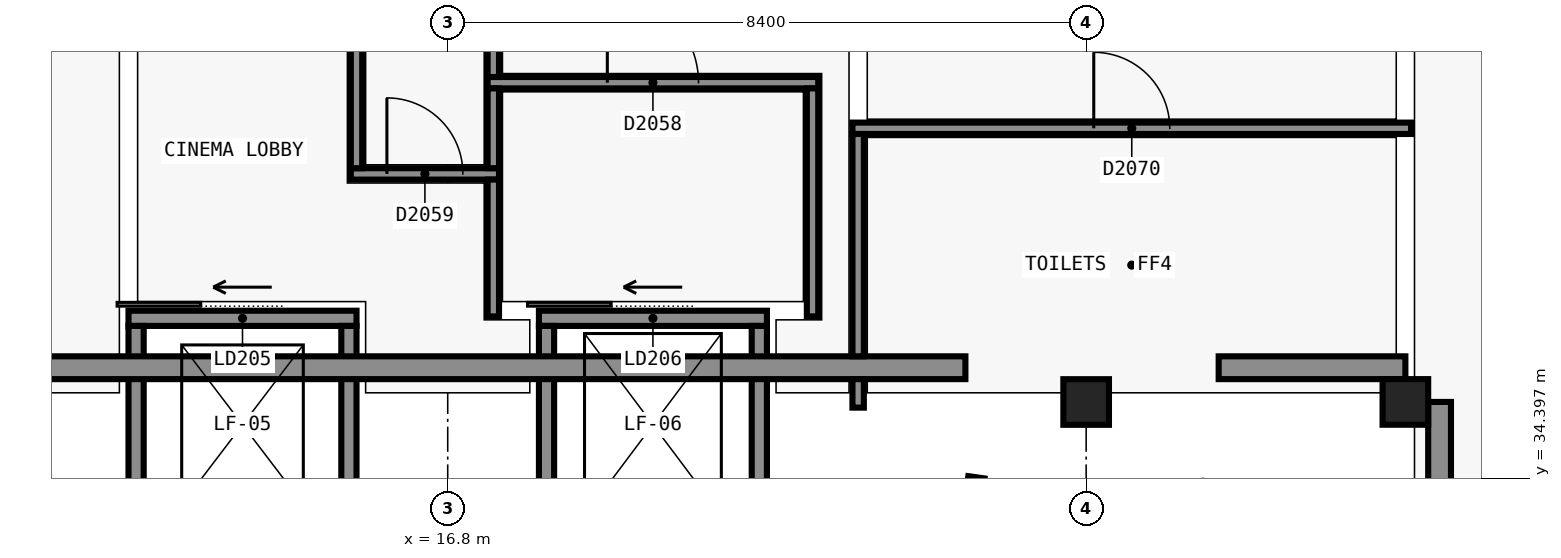
"""IFC4 building model, lengths in metres.
Left out: names, types, materials, properties, quantities, classifications, styles, units other than length and angle.
Written with IfcOpenShell. Run it as: python <this file> out.ifc"""

import sys

from ifc_helpers import new_model, si_unit, direction, frame, frame_2d, origin, origin_2d, place, context, subcontext, project, spatial, rectangle, extrude, element, fill, save


model = new_model("IFC4")
c1 = context("Model", 3, precision=1e-05, world=origin(), true_north=direction((0.0, 1.0)))
c2 = subcontext(c1, "Body", "Model", "MODEL_VIEW")
j1 = project(units=[si_unit("LENGTHUNIT", "METRE"), si_unit("PLANEANGLEUNIT", "RADIAN")], contexts=[c1])
p1 = place(None, origin())
s1 = spatial("IfcSite", under=j1, at=p1, CompositionType="ELEMENT")
p2 = place(p1, origin())
s2 = spatial("IfcBuilding", under=s1, at=p2, CompositionType="ELEMENT")
p3 = place(p2, frame((0.0, 0.0, 10.2)))
s3 = spatial("IfcBuildingStorey", under=s2, at=p3, CompositionType="ELEMENT", Elevation=10.2)
p4 = place(p3, frame((12.6, 36.5, 0.0), z_axis=(0.0, 0.0, 1.0), x_axis=(1.0, 0.0, 0.0)))
e1 = element("IfcWall", 1, at=p4, inside=s3, PredefinedType="SHEAR", context=c2, shape_type="SweptSolid", body=[
    extrude(rectangle(XDim=3.0, YDim=0.2, at=frame_2d((1.5, 0.0))), origin(), (0.0, 0.0, 1.0), 4.8),
])
p5 = place(p4, frame((0.95, 0.0, 0.0)))
e2 = element("IfcOpeningElement", 2, at=p5, cuts=e1, PredefinedType="OPENING", context=c2, shape_type="SweptSolid", body=[
    extrude(rectangle(XDim=1.1, YDim=2.1, at=frame_2d((0.55, 1.05))), frame((0.0, 0.11, 0.0), z_axis=(0.0, -1.0, 0.0), x_axis=(1.0, 0.0, 0.0)), (0.0, 0.0, 1.0), 0.22),
])
for number, where, z_axis, x_axis in (
    (3, (12.7, 33.8, 0.0), (0.0, 0.0, 1.0), (0.0, 1.0, 0.0)),
    (4, (15.5, 36.4, 0.0), (0.0, 0.0, 1.0), (0.0, -1.0, 0.0)),
):
    element("IfcWall", number, at=place(p3, frame(where, z_axis=z_axis, x_axis=x_axis)), inside=s3, PredefinedType="SHEAR", context=c2, shape_type="SweptSolid", body=[
        extrude(rectangle(XDim=2.6, YDim=0.2, at=frame_2d((1.3, 0.0))), origin(), (0.0, 0.0, 1.0), 4.8),
    ])
p6 = place(p3, frame((18.0, 36.5, 0.0), z_axis=(0.0, 0.0, 1.0), x_axis=(1.0, 0.0, 0.0)))
e5 = element("IfcWall", 5, at=p6, inside=s3, PredefinedType="SHEAR", context=c2, shape_type="SweptSolid", body=[
    extrude(rectangle(XDim=3.0, YDim=0.2, at=frame_2d((1.5, 0.0))), origin(), (0.0, 0.0, 1.0), 4.8),
])
p7 = place(p6, frame((0.95, 0.0, 0.0)))
e6 = element("IfcOpeningElement", 6, at=p7, cuts=e5, PredefinedType="OPENING", context=c2, shape_type="SweptSolid", body=[
    extrude(rectangle(XDim=1.1, YDim=2.1, at=frame_2d((0.55, 1.05))), frame((0.0, 0.11, 0.0), z_axis=(0.0, -1.0, 0.0), x_axis=(1.0, 0.0, 0.0)), (0.0, 0.0, 1.0), 0.22),
])
for number, where, z_axis, x_axis in (
    (7, (18.1, 33.8, 0.0), (0.0, 0.0, 1.0), (0.0, 1.0, 0.0)),
    (8, (20.9, 36.4, 0.0), (0.0, 0.0, 1.0), (0.0, -1.0, 0.0)),
):
    element("IfcWall", number, at=place(p3, frame(where, z_axis=z_axis, x_axis=x_axis)), inside=s3, PredefinedType="SHEAR", context=c2, shape_type="SweptSolid", body=[
        extrude(rectangle(XDim=2.6, YDim=0.2, at=frame_2d((1.3, 0.0))), origin(), (0.0, 0.0, 1.0), 4.8),
    ])
for number, where, z_axis, x_axis in (
    (9, (25.2, 35.399, 0.0), (0.0, 0.0, 1.0), (1.0, 0.0, 0.0)),
    (10, (29.4, 35.4, 0.0), (0.0, 0.0, 1.0), (1.0, 0.0, 0.0)),
):
    element("IfcColumn", number, at=place(p3, frame(where, z_axis=z_axis, x_axis=x_axis)), inside=s3, PredefinedType="COLUMN", context=c2, shape_type="SweptSolid", body=[
        extrude(rectangle(XDim=0.6, YDim=0.6, at=origin_2d()), origin(), (0.0, 0.0, 1.0), 4.8),
    ])
p8 = place(p3, frame((23.756, 34.409, 0.0), z_axis=(0.0, 0.0, 1.0), x_axis=(-0.13918000587, -0.990267098295, 0.0)))
e11 = element("IfcWall", 11, at=p8, inside=s3, PredefinedType="SOLIDWALL", context=c2, shape_type="SweptSolid", body=[
    extrude(rectangle(XDim=1.8, YDim=0.215, at=frame_2d((0.9, 0.0))), origin(), (0.0, 0.0, 1.0), 4.5),
])
p9 = place(p3, frame((23.611, 35.85, 0.0), z_axis=(0.0, 0.0, 1.0), x_axis=(-1.0, 0.0, 0.0)))
e12 = element("IfcWall", 12, at=p9, inside=s3, PredefinedType="SOLIDWALL", context=c2, shape_type="SweptSolid", body=[
    extrude(rectangle(XDim=13.468, YDim=0.3, at=frame_2d((6.734, 0.0))), origin(), (0.0, 0.0, 1.0), 4.5),
])
p10 = place(p3, frame((29.4, 35.85, 0.0), z_axis=(0.0, 0.0, 1.0), x_axis=(-1.0, 0.0, 0.0)))
e13 = element("IfcWall", 13, at=p10, inside=s3, PredefinedType="SOLIDWALL", context=c2, shape_type="SweptSolid", body=[
    extrude(rectangle(XDim=2.456, YDim=0.3, at=frame_2d((1.228, 0.0))), origin(), (0.0, 0.0, 1.0), 4.5),
])
p11 = place(p3, frame((29.85, 33.6, 0.0), z_axis=(0.0, 0.0, 1.0), x_axis=(0.0, 1.0, 0.0)))
e14 = element("IfcWall", 14, at=p11, inside=s3, PredefinedType="SOLIDWALL", context=c2, shape_type="SweptSolid", body=[
    extrude(rectangle(XDim=1.8, YDim=0.3, at=frame_2d((0.9, 0.0))), origin(), (0.0, 0.0, 1.0), 4.5),
])
p12 = place(p3, frame((15.525, 38.4, 0.0), z_axis=(0.0, 0.0, 1.0), x_axis=(1.0, 0.0, 0.0)))
e15 = element("IfcWall", 15, at=p12, inside=s3, PredefinedType="PARTITIONING", context=c2, shape_type="SweptSolid", body=[
    extrude(rectangle(XDim=1.95, YDim=0.15, at=frame_2d((0.975, 0.0))), origin(), (0.0, 0.0, 1.0), 3.8),
])
p13 = place(p12, frame((0.475, 0.0, 0.0)))
e16 = element("IfcOpeningElement", 16, at=p13, cuts=e15, PredefinedType="OPENING", context=c2, shape_type="SweptSolid", body=[
    extrude(rectangle(XDim=1.0, YDim=2.1, at=frame_2d((0.5, 1.05))), frame((0.0, 0.085, 0.0), z_axis=(0.0, -1.0, 0.0), x_axis=(1.0, 0.0, 0.0)), (0.0, 0.0, 1.0), 0.17),
])
p14 = place(p3, frame((22.125, 39.0, 0.0), z_axis=(0.0, 0.0, 1.0), x_axis=(1.0, 0.0, 0.0)))
e17 = element("IfcWall", 17, at=p14, inside=s3, PredefinedType="PARTITIONING", context=c2, shape_type="SweptSolid", body=[
    extrude(rectangle(XDim=7.35, YDim=0.15, at=frame_2d((3.675, 0.0))), origin(), (0.0, 0.0, 1.0), 3.8),
])
p15 = place(p14, frame((3.175, 0.0, 0.0)))
e18 = element("IfcOpeningElement", 18, at=p15, cuts=e17, PredefinedType="OPENING", context=c2, shape_type="SweptSolid", body=[
    extrude(rectangle(XDim=1.0, YDim=2.1, at=frame_2d((0.5, 1.05))), frame((0.0, 0.085, 0.0), z_axis=(0.0, -1.0, 0.0), x_axis=(1.0, 0.0, 0.0)), (0.0, 0.0, 1.0), 0.17),
])
p16 = place(p3, frame((17.325, 39.6, 0.0), z_axis=(0.0, 0.0, 1.0), x_axis=(1.0, 0.0, 0.0)))
e19 = element("IfcWall", 19, at=p16, inside=s3, PredefinedType="SOLIDWALL", context=c2, shape_type="SweptSolid", body=[
    extrude(rectangle(XDim=4.35, YDim=0.15, at=frame_2d((2.175, 0.0))), origin(), (0.0, 0.0, 1.0), 3.8),
])
p17 = place(p16, frame((1.575, 0.0, 0.0)))
e20 = element("IfcOpeningElement", 20, at=p17, cuts=e19, PredefinedType="OPENING", context=c2, shape_type="SweptSolid", body=[
    extrude(rectangle(XDim=1.2, YDim=2.1, at=frame_2d((0.6, 1.05))), frame((0.0, 0.085, 0.0), z_axis=(0.0, -1.0, 0.0), x_axis=(1.0, 0.0, 0.0)), (0.0, 0.0, 1.0), 0.17),
])
p18 = place(p3, frame((15.6, 38.475, 0.0), z_axis=(0.0, 0.0, 1.0), x_axis=(0.0, 1.0, 0.0)))
e21 = element("IfcWall", 21, at=p18, inside=s3, PredefinedType="PARTITIONING", context=c2, shape_type="SweptSolid", body=[
    extrude(rectangle(XDim=1.65, YDim=0.15, at=frame_2d((0.825, 0.0))), origin(), (0.0, 0.0, 1.0), 4.5),
])
p19 = place(p3, frame((17.4, 39.675, 0.0), z_axis=(0.0, 0.0, 1.0), x_axis=(0.0, 1.0, 0.0)))
e22 = element("IfcWall", 22, at=p19, inside=s3, PredefinedType="PARTITIONING", context=c2, shape_type="SweptSolid", body=[
    extrude(rectangle(XDim=0.45, YDim=0.15, at=frame_2d((0.225, 0.0))), origin(), (0.0, 0.0, 1.0), 4.5),
])
p20 = place(p3, frame((22.2, 35.325, 0.0), z_axis=(0.0, 0.0, 1.0), x_axis=(0.0, 1.0, 0.0)))
e23 = element("IfcWall", 23, at=p20, inside=s3, PredefinedType="PARTITIONING", context=c2, shape_type="SweptSolid", body=[
    extrude(rectangle(XDim=0.375, YDim=0.15, at=frame_2d((0.188, 0.0))), origin(), (0.0, 0.0, 1.0), 4.0),
])
p21 = place(p3, frame((22.2, 36.0, 0.0), z_axis=(0.0, 0.0, 1.0), x_axis=(0.0, 1.0, 0.0)))
e24 = element("IfcWall", 24, at=p21, inside=s3, PredefinedType="PARTITIONING", context=c2, shape_type="SweptSolid", body=[
    extrude(rectangle(XDim=2.925, YDim=0.15, at=frame_2d((1.462, 0.0))), origin(), (0.0, 0.0, 1.0), 4.5),
])
p22 = place(p3, frame((17.4, 36.525, 0.0), z_axis=(0.0, 0.0, 1.0), x_axis=(0.0, 1.0, 0.0)))
e25 = element("IfcWall", 25, at=p22, inside=s3, PredefinedType="SOLIDWALL", context=c2, shape_type="SweptSolid", body=[
    extrude(rectangle(XDim=1.8, YDim=0.15, at=frame_2d((0.9, 0.0))), origin(), (0.0, 0.0, 1.0), 4.5),
])
p23 = place(p3, frame((17.4, 38.475, 0.0), z_axis=(0.0, 0.0, 1.0), x_axis=(0.0, 1.0, 0.0)))
e26 = element("IfcWall", 26, at=p23, inside=s3, PredefinedType="SOLIDWALL", context=c2, shape_type="SweptSolid", body=[
    extrude(rectangle(XDim=1.05, YDim=0.15, at=frame_2d((0.525, 0.0))), origin(), (0.0, 0.0, 1.0), 4.5),
])
p24 = place(p3, frame((21.6, 36.525, 0.0), z_axis=(0.0, 0.0, 1.0), x_axis=(0.0, 1.0, 0.0)))
e27 = element("IfcWall", 27, at=p24, inside=s3, PredefinedType="SOLIDWALL", context=c2, shape_type="SweptSolid", body=[
    extrude(rectangle(XDim=3.0, YDim=0.15, at=frame_2d((1.5, 0.0))), origin(), (0.0, 0.0, 1.0), 4.5),
])
p25 = place(p5, origin())
e28 = element("IfcDoor", 28, at=p25, inside=s3, OperationType="SLIDING_TO_LEFT", PredefinedType="DOOR", context=c2, shape_type="SweptSolid", body=[
    extrude(rectangle(XDim=1.1, YDim=2.1, at=frame_2d((0.55, 1.05))), frame((0.0, 0.025, 0.0), z_axis=(0.0, -1.0, 0.0), x_axis=(1.0, 0.0, 0.0)), (0.0, 0.0, 1.0), 0.05),
])
fill(e2, e28)
p26 = place(p7, origin())
e29 = element("IfcDoor", 29, at=p26, inside=s3, OperationType="SLIDING_TO_LEFT", PredefinedType="DOOR", context=c2, shape_type="SweptSolid", body=[
    extrude(rectangle(XDim=1.1, YDim=2.1, at=frame_2d((0.55, 1.05))), frame((0.0, 0.025, 0.0), z_axis=(0.0, -1.0, 0.0), x_axis=(1.0, 0.0, 0.0)), (0.0, 0.0, 1.0), 0.05),
])
fill(e6, e29)
p27 = place(p17, origin())
e30 = element("IfcDoor", 30, at=p27, inside=s3, OperationType="SINGLE_SWING_RIGHT", PredefinedType="DOOR", context=c2, shape_type="SweptSolid", body=[
    extrude(rectangle(XDim=1.2, YDim=2.1, at=frame_2d((0.6, 1.05))), frame((0.0, 0.025, 0.0), z_axis=(0.0, -1.0, 0.0), x_axis=(1.0, 0.0, 0.0)), (0.0, 0.0, 1.0), 0.05),
])
fill(e20, e30)
p28 = place(p13, origin())
e31 = element("IfcDoor", 31, at=p28, inside=s3, OperationType="SINGLE_SWING_RIGHT", PredefinedType="DOOR", context=c2, shape_type="SweptSolid", body=[
    extrude(rectangle(XDim=1.0, YDim=2.1, at=frame_2d((0.5, 1.05))), frame((0.0, 0.025, 0.0), z_axis=(0.0, -1.0, 0.0), x_axis=(1.0, 0.0, 0.0)), (0.0, 0.0, 1.0), 0.05),
])
fill(e16, e31)
p29 = place(p15, origin())
e32 = element("IfcDoor", 32, at=p29, inside=s3, OperationType="SINGLE_SWING_LEFT", PredefinedType="DOOR", context=c2, shape_type="SweptSolid", body=[
    extrude(rectangle(XDim=1.0, YDim=2.1, at=frame_2d((0.5, 1.05))), frame((0.0, 0.025, 0.0), z_axis=(0.0, -1.0, 0.0), x_axis=(1.0, 0.0, 0.0)), (0.0, 0.0, 1.0), 0.05),
])
fill(e18, e32)
save(model, sys.argv[1])
